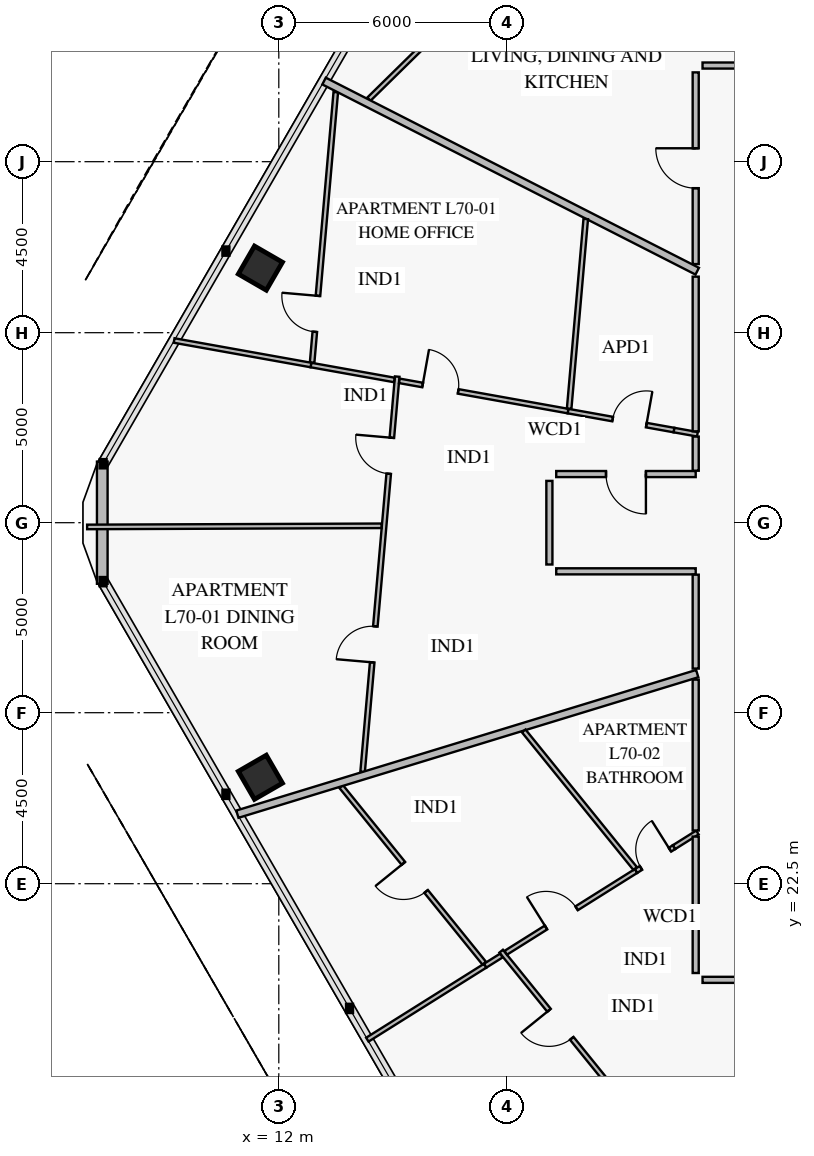
"""IFC4 building model, lengths in metres.
Left out: names, types, materials, properties, quantities, classifications, styles, units other than length and angle.
Written with IfcOpenShell. Run it as: python <this file> out.ifc"""

import sys

from ifc_helpers import new_model, si_unit, direction, frame, frame_2d, origin, origin_2d, place, context, subcontext, project, spatial, rectangle, extrude, element, fill, save


model = new_model("IFC4")
c1 = context("Model", 3, precision=1e-05, world=origin(), true_north=direction((0.0, 1.0)))
c2 = subcontext(c1, "Body", "Model", "MODEL_VIEW")
j1 = project(units=[si_unit("LENGTHUNIT", "METRE"), si_unit("PLANEANGLEUNIT", "RADIAN")], contexts=[c1])
p1 = place(None, origin())
s1 = spatial("IfcSite", under=j1, at=p1, CompositionType="ELEMENT")
p2 = place(p1, origin())
s2 = spatial("IfcBuilding", under=s1, at=p2, CompositionType="ELEMENT")
p3 = place(p2, frame((0.0, 0.0, 276.8)))
s3 = spatial("IfcBuildingStorey", under=s2, at=p3, CompositionType="ELEMENT", Elevation=276.8)
for number, where, z_axis, x_axis in (
    (1, (11.515, 38.699, 0.0), (0.0, 0.0, 1.0), (-0.5, -0.866, 0.0)),
    (2, (11.515, 25.301, 0.0), (0.0, 0.0, 1.0), (0.5, -0.866, 0.0)),
):
    element("IfcColumn", number, at=place(p3, frame(where, z_axis=z_axis, x_axis=x_axis)), inside=s3, PredefinedType="COLUMN", context=c2, shape_type="SweptSolid", body=[
        extrude(rectangle(XDim=0.85, YDim=0.85, at=origin_2d()), origin(), (0.0, 0.0, 1.0), 3.55),
    ])
p4 = place(p3, frame((7.355, 30.393, 0.0), z_axis=(0.0, 0.0, 1.0), x_axis=(0.0, 1.0, 0.0)))
e3 = element("IfcWall", 3, at=p4, inside=s3, PredefinedType="SOLIDWALL", context=c2, shape_type="SweptSolid", body=[
    extrude(rectangle(XDim=3.215, YDim=0.28, at=frame_2d((1.607, 0.0))), origin(), (0.0, 0.0, 1.0), 3.55),
])
p5 = place(p3, frame((15.115, 35.844, 0.0), z_axis=(0.0, 0.0, 1.0), x_axis=(-0.087167240255, -0.996193692123, 0.0)))
e4 = element("IfcWall", 4, at=p5, inside=s3, PredefinedType="PARTITIONING", context=c2, shape_type="SweptSolid", body=[
    extrude(rectangle(XDim=10.444, YDim=0.12, at=frame_2d((5.222, 0.0))), origin(), (0.0, 0.0, 1.0), 2.95),
])
p6 = place(p5, frame((1.616, 0.0, 0.0)))
e5 = element("IfcOpeningElement", 5, at=p6, cuts=e4, PredefinedType="OPENING", context=c2, shape_type="SweptSolid", body=[
    extrude(rectangle(XDim=0.95, YDim=2.1, at=frame_2d((0.475, 1.05))), frame((0.0, 0.072, 0.0), z_axis=(0.0, -1.0, 0.0), x_axis=(1.0, 0.0, 0.0)), (0.0, 0.0, 1.0), 0.144),
])
p7 = place(p5, frame((6.598, 0.0, 0.0)))
e6 = element("IfcOpeningElement", 6, at=p7, cuts=e4, PredefinedType="OPENING", context=c2, shape_type="SweptSolid", body=[
    extrude(rectangle(XDim=0.95, YDim=2.1, at=frame_2d((0.475, 1.05))), frame((0.0, 0.072, 0.0), z_axis=(0.0, -1.0, 0.0), x_axis=(1.0, 0.0, 0.0)), (0.0, 0.0, 1.0), 0.144),
])
p8 = place(p3, frame((22.4, 34.437, 0.0), z_axis=(0.0, 0.0, 1.0), x_axis=(-0.984321470617, 0.176383793142, 0.0)))
e7 = element("IfcWall", 7, at=p8, inside=s3, PredefinedType="PARTITIONING", context=c2, shape_type="SweptSolid", body=[
    extrude(rectangle(XDim=2.835, YDim=0.12, at=frame_2d((1.417, 0.0))), origin(), (0.0, 0.0, 1.0), 3.55),
])
p9 = place(p8, frame((0.741, 0.0, 0.0)))
e8 = element("IfcOpeningElement", 8, at=p9, cuts=e7, PredefinedType="OPENING", context=c2, shape_type="SweptSolid", body=[
    extrude(rectangle(XDim=0.9, YDim=2.1, at=frame_2d((0.45, 1.05))), frame((0.0, 0.072, 0.0), z_axis=(0.0, -1.0, 0.0), x_axis=(1.0, 0.0, 0.0)), (0.0, 0.0, 1.0), 0.144),
])
p10 = place(p3, frame((19.61, 34.937, 0.0), z_axis=(0.0, 0.0, 1.0), x_axis=(-0.984317552752, 0.176405655645, 0.0)))
e9 = element("IfcWall", 9, at=p10, inside=s3, PredefinedType="PARTITIONING", context=c2, shape_type="SweptSolid", body=[
    extrude(rectangle(XDim=4.506, YDim=0.12, at=frame_2d((2.253, 0.0))), origin(), (0.0, 0.0, 1.0), 3.55),
])
p11 = place(p10, frame((2.936, 0.0, 0.0)))
e10 = element("IfcOpeningElement", 10, at=p11, cuts=e9, PredefinedType="OPENING", context=c2, shape_type="SweptSolid", body=[
    extrude(rectangle(XDim=0.95, YDim=2.1, at=frame_2d((0.475, 1.05))), frame((0.0, 0.072, 0.0), z_axis=(0.0, -1.0, 0.0), x_axis=(1.0, 0.0, 0.0)), (0.0, 0.0, 1.0), 0.144),
])
p12 = place(p3, frame((15.04, 35.756, 0.0), z_axis=(0.0, 0.0, 1.0), x_axis=(-0.984322452482, 0.176378313689, 0.0)))
e11 = element("IfcWall", 11, at=p12, inside=s3, PredefinedType="PARTITIONING", context=c2, shape_type="SweptSolid", body=[
    extrude(rectangle(XDim=2.229, YDim=0.12, at=frame_2d((1.114, 0.0))), origin(), (0.0, 0.0, 1.0), 3.55),
])
p13 = place(p3, frame((13.5, 43.33, 0.0), z_axis=(0.0, 0.0, 1.0), x_axis=(-0.087173732825, -0.996193124, 0.0)))
e12 = element("IfcWall", 12, at=p13, inside=s3, PredefinedType="PARTITIONING", context=c2, shape_type="SweptSolid", body=[
    extrude(rectangle(XDim=7.144, YDim=0.12, at=frame_2d((3.572, 0.0))), origin(), (0.0, 0.0, 1.0), 2.93),
])
p14 = place(p13, frame((5.382, 0.0, 0.0)))
e13 = element("IfcOpeningElement", 13, at=p14, cuts=e12, PredefinedType="OPENING", context=c2, shape_type="SweptSolid", body=[
    extrude(rectangle(XDim=0.95, YDim=2.1, at=frame_2d((0.475, 1.05))), frame((0.0, 0.072, 0.0), z_axis=(0.0, -1.0, 0.0), x_axis=(1.0, 0.0, 0.0)), (0.0, 0.0, 1.0), 0.144),
])
p15 = place(p3, frame((22.97, 33.28, 0.0), z_axis=(0.0, 0.0, 1.0), x_axis=(-1.0, 0.0, 0.0)))
e14 = element("IfcWall", 14, at=p15, inside=s3, PredefinedType="PARTITIONING", context=c2, shape_type="SweptSolid", body=[
    extrude(rectangle(XDim=3.67, YDim=0.16, at=frame_2d((1.835, 0.0))), origin(), (0.0, 0.0, 1.0), 3.55),
])
p16 = place(p15, frame((1.31, 0.0, 0.0)))
e15 = element("IfcOpeningElement", 15, at=p16, cuts=e14, PredefinedType="OPENING", context=c2, shape_type="SweptSolid", body=[
    extrude(rectangle(XDim=1.05, YDim=2.15, at=frame_2d((0.525, 1.075))), frame((0.0, 0.092, 0.0), z_axis=(0.0, -1.0, 0.0), x_axis=(1.0, 0.0, 0.0)), (0.0, 0.0, 1.0), 0.184),
])
p17 = place(p3, frame((17.851, 20.725, 0.0), z_axis=(0.0, 0.0, 1.0), x_axis=(0.629311937349, -0.777152807053, 0.0)))
e16 = element("IfcWall", 16, at=p17, inside=s3, PredefinedType="PARTITIONING", context=c2, shape_type="SweptSolid", body=[
    extrude(rectangle(XDim=11.117, YDim=0.12, at=frame_2d((5.559, 0.0))), origin(), (0.0, 0.0, 1.0), 2.95),
])
p18 = place(p17, frame((2.001, 0.0, 0.0)))
e17 = element("IfcOpeningElement", 17, at=p18, cuts=e16, PredefinedType="OPENING", context=c2, shape_type="SweptSolid", body=[
    extrude(rectangle(XDim=0.95, YDim=2.1, at=frame_2d((0.475, 1.05))), frame((0.0, 0.072, 0.0), z_axis=(0.0, -1.0, 0.0), x_axis=(1.0, 0.0, 0.0)), (0.0, 0.0, 1.0), 0.144),
])
p19 = place(p17, frame((7.319, 0.0, 0.0)))
e18 = element("IfcOpeningElement", 18, at=p19, cuts=e16, PredefinedType="OPENING", context=c2, shape_type="SweptSolid", body=[
    extrude(rectangle(XDim=0.95, YDim=2.1, at=frame_2d((0.475, 1.05))), frame((0.0, 0.072, 0.0), z_axis=(0.0, -1.0, 0.0), x_axis=(1.0, 0.0, 0.0)), (0.0, 0.0, 1.0), 0.144),
])
p20 = place(p3, frame((22.4, 23.462, 0.0), z_axis=(0.0, 0.0, 1.0), x_axis=(-0.846918091409, -0.531723373987, 0.0)))
e19 = element("IfcWall", 19, at=p20, inside=s3, PredefinedType="PARTITIONING", context=c2, shape_type="SweptSolid", body=[
    extrude(rectangle(XDim=1.183, YDim=0.12, at=frame_2d((0.591, 0.0))), origin(), (0.0, 0.0, 1.0), 3.55),
])
p21 = place(p20, frame((0.127, 0.0, 0.0)))
e20 = element("IfcOpeningElement", 20, at=p21, cuts=e19, PredefinedType="OPENING", context=c2, shape_type="SweptSolid", body=[
    extrude(rectangle(XDim=0.9, YDim=2.1, at=frame_2d((0.45, 1.05))), frame((0.0, 0.072, 0.0), z_axis=(0.0, -1.0, 0.0), x_axis=(1.0, 0.0, 0.0)), (0.0, 0.0, 1.0), 0.144),
])
p22 = place(p3, frame((21.398, 22.833, 0.0), z_axis=(0.0, 0.0, 1.0), x_axis=(-0.84692159597, -0.531717791953, 0.0)))
e21 = element("IfcWall", 21, at=p22, inside=s3, PredefinedType="PARTITIONING", context=c2, shape_type="SweptSolid", body=[
    extrude(rectangle(XDim=4.045, YDim=0.12, at=frame_2d((2.022, 0.0))), origin(), (0.0, 0.0, 1.0), 3.15),
])
p23 = place(p22, frame((1.844, 0.0, 0.0)))
e22 = element("IfcOpeningElement", 22, at=p23, cuts=e21, PredefinedType="OPENING", context=c2, shape_type="SweptSolid", body=[
    extrude(rectangle(XDim=0.95, YDim=2.1, at=frame_2d((0.475, 1.05))), frame((0.0, 0.072, 0.0), z_axis=(0.0, -1.0, 0.0), x_axis=(1.0, 0.0, 0.0)), (0.0, 0.0, 1.0), 0.144),
])
p24 = place(p3, frame((17.857, 20.61, 0.0), z_axis=(0.0, 0.0, 1.0), x_axis=(-0.847021311188, -0.531558932192, 0.0)))
e23 = element("IfcWall", 23, at=p24, inside=s3, PredefinedType="PARTITIONING", context=c2, shape_type="SweptSolid", body=[
    extrude(rectangle(XDim=0.506, YDim=0.12, at=frame_2d((0.253, 0.0))), origin(), (0.0, 0.0, 1.0), 3.55),
])
p25 = place(p3, frame((13.642, 25.055, 0.0), z_axis=(0.0, 0.0, 1.0), x_axis=(0.629353217971, -0.777119377593, 0.0)))
e24 = element("IfcWall", 24, at=p25, inside=s3, PredefinedType="PARTITIONING", context=c2, shape_type="SweptSolid", body=[
    extrude(rectangle(XDim=5.981, YDim=0.12, at=frame_2d((2.99, 0.0))), origin(), (0.0, 0.0, 1.0), 3.55),
])
p26 = place(p25, frame((2.6, 0.0, 0.0)))
e25 = element("IfcOpeningElement", 25, at=p26, cuts=e24, PredefinedType="OPENING", context=c2, shape_type="SweptSolid", body=[
    extrude(rectangle(XDim=0.95, YDim=2.1, at=frame_2d((0.475, 1.05))), frame((0.0, 0.072, 0.0), z_axis=(0.0, -1.0, 0.0), x_axis=(1.0, 0.0, 0.0)), (0.0, 0.0, 1.0), 0.144),
])
p27 = place(p3, frame((23.15, 19.97, 0.0), z_axis=(0.0, 0.0, 1.0), x_axis=(1.0, 0.0, 0.0)))
e26 = element("IfcWall", 26, at=p27, inside=s3, PredefinedType="PARTITIONING", context=c2, shape_type="SweptSolid", body=[
    extrude(rectangle(XDim=6.021, YDim=0.16, at=frame_2d((3.01, 0.0))), origin(), (0.0, 0.0, 1.0), 2.95),
])
p28 = place(p27, frame((2.485, 0.0, 0.0)))
e27 = element("IfcOpeningElement", 27, at=p28, cuts=e26, PredefinedType="OPENING", context=c2, shape_type="SweptSolid", body=[
    extrude(rectangle(XDim=1.05, YDim=2.15, at=frame_2d((0.525, 1.075))), frame((0.0, 0.092, 0.0), z_axis=(0.0, -1.0, 0.0), x_axis=(1.0, 0.0, 0.0)), (0.0, 0.0, 1.0), 0.184),
])
p29 = place(p3, frame((21.851, 50.496, 0.0), z_axis=(0.0, 0.0, 1.0), x_axis=(-0.713249440672, -0.700910290537, 0.0)))
e28 = element("IfcWall", 28, at=p29, inside=s3, PredefinedType="PARTITIONING", context=c2, shape_type="SweptSolid", body=[
    extrude(rectangle(XDim=10.487, YDim=0.12, at=frame_2d((5.243, 0.0))), origin(), (0.0, 0.0, 1.0), 2.95),
])
p30 = place(p29, frame((4.768, 0.0, 0.0)))
e29 = element("IfcOpeningElement", 29, at=p30, cuts=e28, PredefinedType="OPENING", context=c2, shape_type="SweptSolid", body=[
    extrude(rectangle(XDim=0.95, YDim=2.1, at=frame_2d((0.475, 1.05))), frame((0.0, 0.072, 0.0), z_axis=(0.0, -1.0, 0.0), x_axis=(1.0, 0.0, 0.0)), (0.0, 0.0, 1.0), 0.144),
])
p31 = place(p3, frame((22.97, 43.85, 0.0), z_axis=(0.0, 0.0, 1.0), x_axis=(0.0, -1.0, 0.0)))
e30 = element("IfcWall", 30, at=p31, inside=s3, PredefinedType="PARTITIONING", context=c2, shape_type="SweptSolid", body=[
    extrude(rectangle(XDim=5.045, YDim=0.16, at=frame_2d((2.522, 0.0))), origin(), (0.0, 0.0, 1.0), 3.55),
])
p32 = place(p31, frame((1.997, 0.0, 0.0)))
e31 = element("IfcOpeningElement", 31, at=p32, cuts=e30, PredefinedType="OPENING", context=c2, shape_type="SweptSolid", body=[
    extrude(rectangle(XDim=1.05, YDim=2.15, at=frame_2d((0.525, 1.075))), frame((0.0, 0.092, 0.0), z_axis=(0.0, -1.0, 0.0), x_axis=(1.0, 0.0, 0.0)), (0.0, 0.0, 1.0), 0.184),
])
p33 = place(p3, frame((23.01, 38.619, 0.0), z_axis=(0.0, 0.0, 1.0), x_axis=(-0.891002805017, 0.453997798951, 0.0)))
e32 = element("IfcWall", 32, at=p33, inside=s3, PredefinedType="PARTITIONING", context=c2, shape_type="SweptSolid", body=[
    extrude(rectangle(XDim=11.02, YDim=0.2, at=frame_2d((5.51, 0.0))), origin(), (0.0, 0.0, 1.0), 2.93),
])
p34 = place(p3, frame((14.704, 31.918, 0.0), z_axis=(0.0, 0.0, 1.0), x_axis=(-0.99999260876, -0.003844792105, 0.0)))
e33 = element("IfcWall", 33, at=p34, inside=s3, PredefinedType="PARTITIONING", context=c2, shape_type="SweptSolid", body=[
    extrude(rectangle(XDim=7.747, YDim=0.12, at=frame_2d((3.874, 0.0))), origin(), (0.0, 0.0, 1.0), 2.93),
])
p35 = place(p3, frame((23.015, 34.327, 0.0), z_axis=(0.0, 0.0, 1.0), x_axis=(-0.984335630705, 0.176304753554, 0.0)))
e34 = element("IfcWall", 34, at=p35, inside=s3, PredefinedType="PARTITIONING", context=c2, shape_type="SweptSolid", body=[
    extrude(rectangle(XDim=0.625, YDim=0.12, at=frame_2d((0.312, 0.0))), origin(), (0.0, 0.0, 1.0), 3.55),
])
p36 = place(p3, frame((12.846, 36.149, 0.0), z_axis=(0.0, 0.0, 1.0), x_axis=(-0.984314332116, 0.176423625375, 0.0)))
e35 = element("IfcWall", 35, at=p36, inside=s3, PredefinedType="PARTITIONING", context=c2, shape_type="SweptSolid", body=[
    extrude(rectangle(XDim=3.657, YDim=0.12, at=frame_2d((1.829, 0.0))), origin(), (0.0, 0.0, 1.0), 2.93),
])
p37 = place(p3, frame((20.077, 39.992, 0.0), z_axis=(0.0, 0.0, 1.0), x_axis=(-0.087174203927, -0.996193082775, 0.0)))
e36 = element("IfcWall", 36, at=p37, inside=s3, PredefinedType="PARTITIONING", context=c2, shape_type="SweptSolid", body=[
    extrude(rectangle(XDim=5.01, YDim=0.12, at=frame_2d((2.505, 0.0))), origin(), (0.0, 0.0, 1.0), 2.95),
])
p38 = place(p3, frame((23.01, 28.029, 0.0), z_axis=(0.0, 0.0, 1.0), x_axis=(-0.956304823796, -0.292371482852, 0.0)))
e37 = element("IfcWall", 37, at=p38, inside=s3, PredefinedType="PARTITIONING", context=c2, shape_type="SweptSolid", body=[
    extrude(rectangle(XDim=12.652, YDim=0.2, at=frame_2d((6.326, 0.0))), origin(), (0.0, 0.0, 1.0), 2.93),
])
p39 = place(p3, frame((23.015, 23.848, 0.0), z_axis=(0.0, 0.0, 1.0), x_axis=(-0.846995618637, -0.531599870212, 0.0)))
e38 = element("IfcWall", 38, at=p39, inside=s3, PredefinedType="PARTITIONING", context=c2, shape_type="SweptSolid", body=[
    extrude(rectangle(XDim=0.726, YDim=0.12, at=frame_2d((0.363, 0.0))), origin(), (0.0, 0.0, 1.0), 3.55),
])
p40 = place(p3, frame((17.428, 20.341, 0.0), z_axis=(0.0, 0.0, 1.0), x_axis=(-0.846935423542, -0.531695766722, 0.0)))
e39 = element("IfcWall", 39, at=p40, inside=s3, PredefinedType="PARTITIONING", context=c2, shape_type="SweptSolid", body=[
    extrude(rectangle(XDim=3.658, YDim=0.12, at=frame_2d((1.829, 0.0))), origin(), (0.0, 0.0, 1.0), 2.93),
])
p41 = place(p3, frame((18.445, 26.52, 0.0), z_axis=(0.0, 0.0, 1.0), x_axis=(0.629305271461, -0.777158204815, 0.0)))
e40 = element("IfcWall", 40, at=p41, inside=s3, PredefinedType="PARTITIONING", context=c2, shape_type="SweptSolid", body=[
    extrude(rectangle(XDim=4.658, YDim=0.12, at=frame_2d((2.329, 0.0))), origin(), (0.0, 0.0, 1.0), 3.55),
])
p42 = place(p3, frame((29.354, 20.01, 0.0), z_axis=(0.0, 0.0, 1.0), x_axis=(-0.48480997026, -0.874619513124, 0.0)))
e41 = element("IfcWall", 41, at=p42, inside=s3, PredefinedType="PARTITIONING", context=c2, shape_type="SweptSolid", body=[
    extrude(rectangle(XDim=15.309, YDim=0.2, at=frame_2d((7.654, 0.0))), origin(), (0.0, 0.0, 1.0), 2.93),
])
p43 = place(p3, frame((30.152, 43.99, 0.0), z_axis=(0.0, 0.0, 1.0), x_axis=(-0.438371715405, 0.898793768967, 0.0)))
e42 = element("IfcWall", 42, at=p43, inside=s3, PredefinedType="PARTITIONING", context=c2, shape_type="SweptSolid", body=[
    extrude(rectangle(XDim=15.102, YDim=0.2, at=frame_2d((7.551, 0.0))), origin(), (0.0, 0.0, 1.0), 2.93),
])
p44 = place(p3, frame((19.3, 30.72, 0.0), z_axis=(0.0, 0.0, 1.0), x_axis=(1.0, 0.0, 0.0)))
e43 = element("IfcWall", 43, at=p44, inside=s3, PredefinedType="PARTITIONING", context=c2, shape_type="SweptSolid", body=[
    extrude(rectangle(XDim=3.67, YDim=0.16, at=frame_2d((1.835, 0.0))), origin(), (0.0, 0.0, 1.0), 3.55),
])
p45 = place(p3, frame((22.97, 30.632, 0.0), z_axis=(0.0, 0.0, 1.0), x_axis=(0.0, -1.0, 0.0)))
e44 = element("IfcWall", 44, at=p45, inside=s3, PredefinedType="PARTITIONING", context=c2, shape_type="SweptSolid", body=[
    extrude(rectangle(XDim=2.471, YDim=0.16, at=frame_2d((1.235, 0.0))), origin(), (0.0, 0.0, 1.0), 2.95),
])
p46 = place(p3, frame((19.12, 33.1, 0.0), z_axis=(0.0, 0.0, 1.0), x_axis=(0.0, -1.0, 0.0)))
e45 = element("IfcWall", 45, at=p46, inside=s3, PredefinedType="PARTITIONING", context=c2, shape_type="SweptSolid", body=[
    extrude(rectangle(XDim=2.2, YDim=0.16, at=frame_2d((1.1, 0.0))), origin(), (0.0, 0.0, 1.0), 3.55),
])
p47 = place(p3, frame((22.97, 34.266, 0.0), z_axis=(0.0, 0.0, 1.0), x_axis=(0.0, -1.0, 0.0)))
e46 = element("IfcWall", 46, at=p47, inside=s3, PredefinedType="PARTITIONING", context=c2, shape_type="SweptSolid", body=[
    extrude(rectangle(XDim=0.898, YDim=0.16, at=frame_2d((0.449, 0.0))), origin(), (0.0, 0.0, 1.0), 3.55),
])
p48 = place(p3, frame((22.97, 38.474, 0.0), z_axis=(0.0, 0.0, 1.0), x_axis=(0.0, -1.0, 0.0)))
e47 = element("IfcWall", 47, at=p48, inside=s3, PredefinedType="PARTITIONING", context=c2, shape_type="SweptSolid", body=[
    extrude(rectangle(XDim=4.07, YDim=0.16, at=frame_2d((2.035, 0.0))), origin(), (0.0, 0.0, 1.0), 2.95),
])
p49 = place(p3, frame((22.97, 23.74, 0.0), z_axis=(0.0, 0.0, 1.0), x_axis=(0.0, -1.0, 0.0)))
e48 = element("IfcWall", 48, at=p49, inside=s3, PredefinedType="PARTITIONING", context=c2, shape_type="SweptSolid", body=[
    extrude(rectangle(XDim=3.59, YDim=0.16, at=frame_2d((1.795, 0.0))), origin(), (0.0, 0.0, 1.0), 3.55),
])
p50 = place(p3, frame((22.97, 27.871, 0.0), z_axis=(0.0, 0.0, 1.0), x_axis=(0.0, -1.0, 0.0)))
e49 = element("IfcWall", 49, at=p50, inside=s3, PredefinedType="PARTITIONING", context=c2, shape_type="SweptSolid", body=[
    extrude(rectangle(XDim=3.97, YDim=0.16, at=frame_2d((1.985, 0.0))), origin(), (0.0, 0.0, 1.0), 3.55),
])
p51 = place(p3, frame((26.63, 44.03, 0.0), z_axis=(0.0, 0.0, 1.0), x_axis=(-1.0, 0.0, 0.0)))
e50 = element("IfcWall", 50, at=p51, inside=s3, PredefinedType="PARTITIONING", context=c2, shape_type="SweptSolid", body=[
    extrude(rectangle(XDim=3.48, YDim=0.16, at=frame_2d((1.74, 0.0))), origin(), (0.0, 0.0, 1.0), 2.95),
])
p52 = place(p6, frame((0.95, 0.0, 0.0), z_axis=(0.0, 0.0, 1.0), x_axis=(-1.0, 0.0, 0.0)))
e51 = element("IfcDoor", 51, at=p52, inside=s3, OperationType="SINGLE_SWING_RIGHT", PredefinedType="DOOR", context=c2, shape_type="SweptSolid", body=[
    extrude(rectangle(XDim=0.95, YDim=2.1, at=frame_2d((0.475, 1.05))), frame((0.0, 0.025, 0.0), z_axis=(0.0, -1.0, 0.0), x_axis=(1.0, 0.0, 0.0)), (0.0, 0.0, 1.0), 0.05),
])
fill(e5, e51)
p53 = place(p7, frame((0.95, 0.0, 0.0), z_axis=(0.0, 0.0, 1.0), x_axis=(-1.0, 0.0, 0.0)))
e52 = element("IfcDoor", 52, at=p53, inside=s3, OperationType="SINGLE_SWING_LEFT", PredefinedType="DOOR", context=c2, shape_type="SweptSolid", body=[
    extrude(rectangle(XDim=0.95, YDim=2.1, at=frame_2d((0.475, 1.05))), frame((0.0, 0.025, 0.0), z_axis=(0.0, -1.0, 0.0), x_axis=(1.0, 0.0, 0.0)), (0.0, 0.0, 1.0), 0.05),
])
fill(e6, e52)
p54 = place(p9, frame((0.9, 0.0, 0.0), z_axis=(0.0, 0.0, 1.0), x_axis=(-1.0, 0.0, 0.0)))
e53 = element("IfcDoor", 53, at=p54, inside=s3, OperationType="SINGLE_SWING_RIGHT", PredefinedType="DOOR", context=c2, shape_type="SweptSolid", body=[
    extrude(rectangle(XDim=0.9, YDim=2.1, at=frame_2d((0.45, 1.05))), frame((0.0, 0.025, 0.0), z_axis=(0.0, -1.0, 0.0), x_axis=(1.0, 0.0, 0.0)), (0.0, 0.0, 1.0), 0.05),
])
fill(e8, e53)
p55 = place(p11, frame((0.95, 0.0, 0.0), z_axis=(0.0, 0.0, 1.0), x_axis=(-1.0, 0.0, 0.0)))
e54 = element("IfcDoor", 54, at=p55, inside=s3, OperationType="SINGLE_SWING_LEFT", PredefinedType="DOOR", context=c2, shape_type="SweptSolid", body=[
    extrude(rectangle(XDim=0.95, YDim=2.1, at=frame_2d((0.475, 1.05))), frame((0.0, 0.025, 0.0), z_axis=(0.0, -1.0, 0.0), x_axis=(1.0, 0.0, 0.0)), (0.0, 0.0, 1.0), 0.05),
])
fill(e10, e54)
p56 = place(p14, frame((0.95, 0.0, 0.0), z_axis=(0.0, 0.0, 1.0), x_axis=(-1.0, 0.0, 0.0)))
e55 = element("IfcDoor", 55, at=p56, inside=s3, OperationType="SINGLE_SWING_RIGHT", PredefinedType="DOOR", context=c2, shape_type="SweptSolid", body=[
    extrude(rectangle(XDim=0.95, YDim=2.1, at=frame_2d((0.475, 1.05))), frame((0.0, 0.025, 0.0), z_axis=(0.0, -1.0, 0.0), x_axis=(1.0, 0.0, 0.0)), (0.0, 0.0, 1.0), 0.05),
])
fill(e13, e55)
p57 = place(p16, origin())
e56 = element("IfcDoor", 56, at=p57, inside=s3, OperationType="SINGLE_SWING_LEFT", PredefinedType="DOOR", context=c2, shape_type="SweptSolid", body=[
    extrude(rectangle(XDim=1.05, YDim=2.15, at=frame_2d((0.525, 1.075))), frame((0.0, 0.025, 0.0), z_axis=(0.0, -1.0, 0.0), x_axis=(1.0, 0.0, 0.0)), (0.0, 0.0, 1.0), 0.05),
])
fill(e15, e56)
p58 = place(p18, frame((0.95, 0.0, 0.0), z_axis=(0.0, 0.0, 1.0), x_axis=(-1.0, 0.0, 0.0)))
e57 = element("IfcDoor", 57, at=p58, inside=s3, OperationType="SINGLE_SWING_RIGHT", PredefinedType="DOOR", context=c2, shape_type="SweptSolid", body=[
    extrude(rectangle(XDim=0.95, YDim=2.1, at=frame_2d((0.475, 1.05))), frame((0.0, 0.025, 0.0), z_axis=(0.0, -1.0, 0.0), x_axis=(1.0, 0.0, 0.0)), (0.0, 0.0, 1.0), 0.05),
])
fill(e17, e57)
p59 = place(p21, frame((0.9, 0.0, 0.0), z_axis=(0.0, 0.0, 1.0), x_axis=(-1.0, 0.0, 0.0)))
e58 = element("IfcDoor", 58, at=p59, inside=s3, OperationType="SINGLE_SWING_RIGHT", PredefinedType="DOOR", context=c2, shape_type="SweptSolid", body=[
    extrude(rectangle(XDim=0.9, YDim=2.1, at=frame_2d((0.45, 1.05))), frame((0.0, 0.025, 0.0), z_axis=(0.0, -1.0, 0.0), x_axis=(1.0, 0.0, 0.0)), (0.0, 0.0, 1.0), 0.05),
])
fill(e20, e58)
p60 = place(p23, frame((0.95, 0.0, 0.0), z_axis=(0.0, 0.0, 1.0), x_axis=(-1.0, 0.0, 0.0)))
e59 = element("IfcDoor", 59, at=p60, inside=s3, OperationType="SINGLE_SWING_LEFT", PredefinedType="DOOR", context=c2, shape_type="SweptSolid", body=[
    extrude(rectangle(XDim=0.95, YDim=2.1, at=frame_2d((0.475, 1.05))), frame((0.0, 0.025, 0.0), z_axis=(0.0, -1.0, 0.0), x_axis=(1.0, 0.0, 0.0)), (0.0, 0.0, 1.0), 0.05),
])
fill(e22, e59)
p61 = place(p26, frame((0.95, 0.0, 0.0), z_axis=(0.0, 0.0, 1.0), x_axis=(-1.0, 0.0, 0.0)))
e60 = element("IfcDoor", 60, at=p61, inside=s3, OperationType="SINGLE_SWING_RIGHT", PredefinedType="DOOR", context=c2, shape_type="SweptSolid", body=[
    extrude(rectangle(XDim=0.95, YDim=2.1, at=frame_2d((0.475, 1.05))), frame((0.0, 0.025, 0.0), z_axis=(0.0, -1.0, 0.0), x_axis=(1.0, 0.0, 0.0)), (0.0, 0.0, 1.0), 0.05),
])
fill(e25, e60)
p62 = place(p32, frame((1.05, 0.0, 0.0), z_axis=(0.0, 0.0, 1.0), x_axis=(-1.0, 0.0, 0.0)))
e61 = element("IfcDoor", 61, at=p62, inside=s3, OperationType="SINGLE_SWING_RIGHT", PredefinedType="DOOR", context=c2, shape_type="SweptSolid", body=[
    extrude(rectangle(XDim=1.05, YDim=2.15, at=frame_2d((0.525, 1.075))), frame((0.0, 0.025, 0.0), z_axis=(0.0, -1.0, 0.0), x_axis=(1.0, 0.0, 0.0)), (0.0, 0.0, 1.0), 0.05),
])
fill(e31, e61)
save(model, sys.argv[1])
